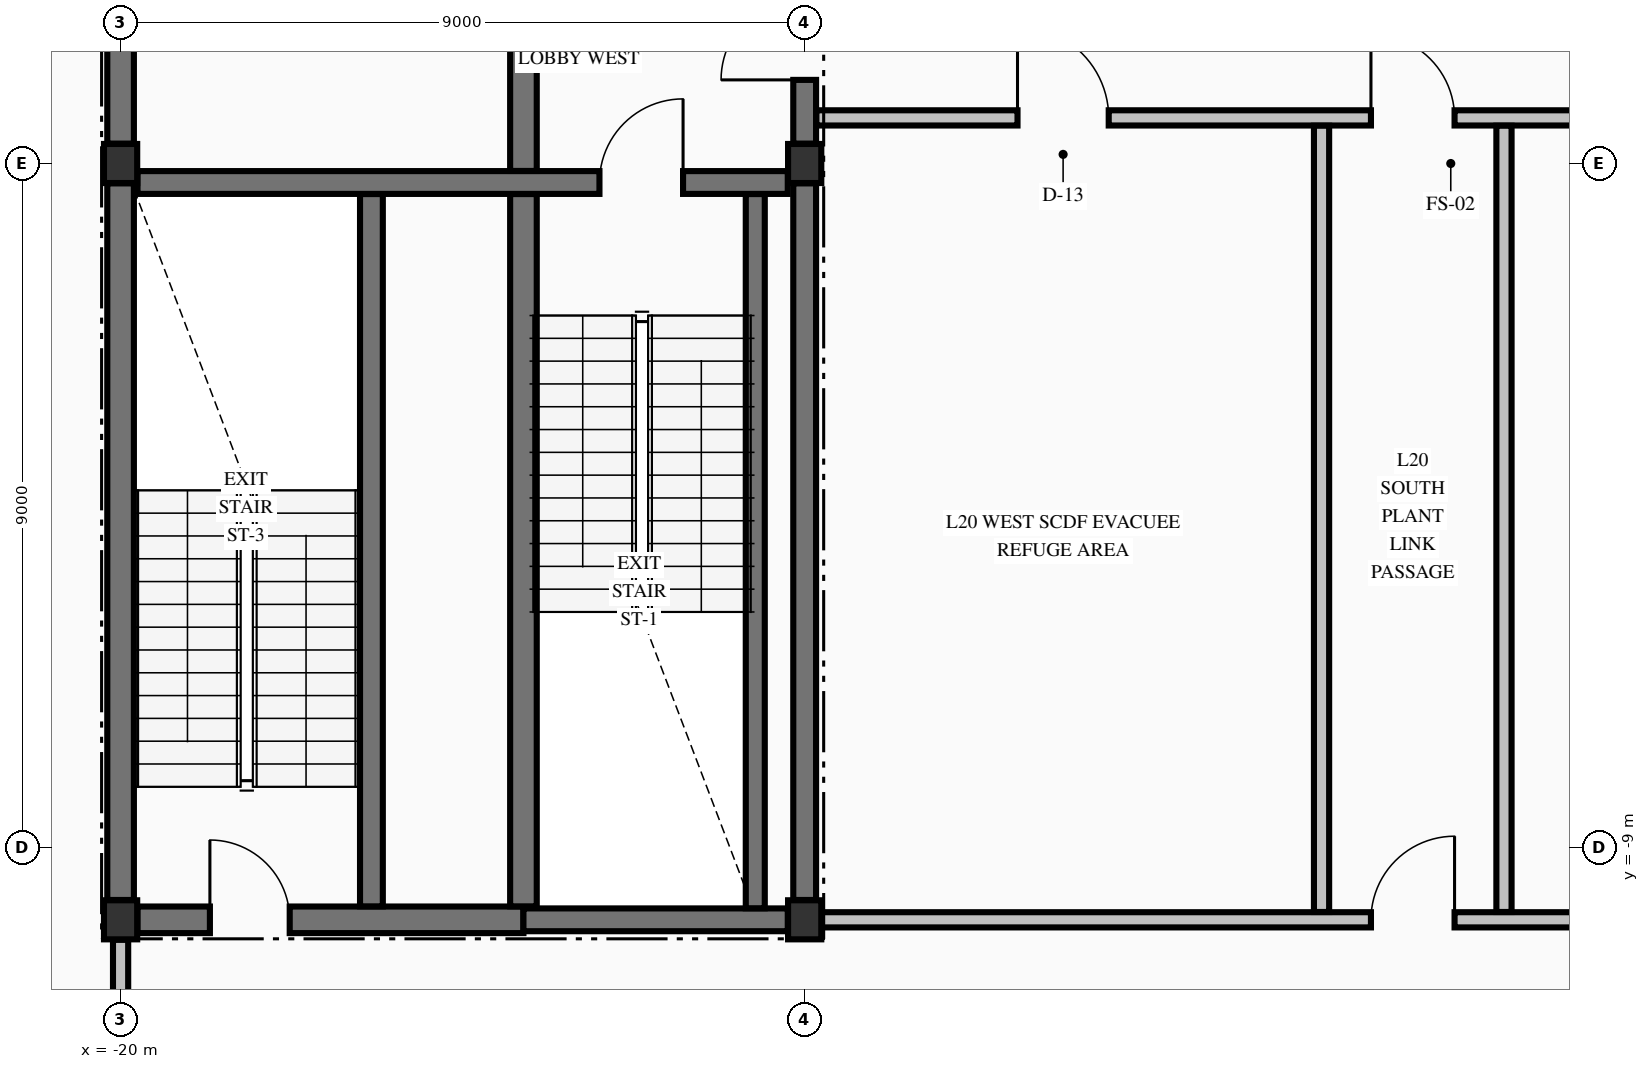
"""IFC4 building model, lengths in metres.
Left out: names, types, materials, properties, quantities, classifications, styles, units other than length and angle.
Written with IfcOpenShell. Run it as: python <this file> out.ifc"""

import sys

from ifc_helpers import new_model, si_unit, direction, frame, frame_2d, origin, origin_2d, place, context, subcontext, project, spatial, rectangle, i_section, extrude, element, fill, save


model = new_model("IFC4")
c1 = context("Model", 3, precision=1e-05, world=origin(), true_north=direction((0.0, 1.0)))
c2 = subcontext(c1, "Body", "Model", "MODEL_VIEW")
j1 = project(units=[si_unit("LENGTHUNIT", "METRE"), si_unit("PLANEANGLEUNIT", "RADIAN")], contexts=[c1])
p1 = place(None, origin())
s1 = spatial("IfcSite", under=j1, at=p1, CompositionType="ELEMENT")
p2 = place(p1, origin())
s2 = spatial("IfcBuilding", under=s1, at=p2, CompositionType="ELEMENT")
p3 = place(p2, frame((0.0, 0.0, 82.18)))
s3 = spatial("IfcBuildingStorey", under=s2, at=p3, CompositionType="ELEMENT", Elevation=82.18)
for number, where, z_axis, x_axis in (
    (1, (-20.0, -9.95, -0.425), (0.0, 0.0, 1.0), (1.0, 0.0, 0.0)),
    (2, (-11.0, -9.95, -0.425), (0.0, 0.0, 1.0), (1.0, 0.0, 0.0)),
    (3, (-11.0, 0.0, -0.425), (0.0, 0.0, 1.0), (1.0, 0.0, 0.0)),
    (4, (-20.0, 0.0, -0.425), (0.0, 0.0, 1.0), (1.0, 0.0, 0.0)),
):
    element("IfcColumn", number, at=place(p3, frame(where, z_axis=z_axis, x_axis=x_axis)), inside=s3, PredefinedType="COLUMN", context=c2, shape_type="SweptSolid", body=[
        extrude(i_section(OverallWidth=0.437, OverallDepth=0.514, WebThickness=0.061, FlangeThickness=0.097, FilletRadius=0.015, at=origin_2d()), origin(), (0.0, 0.0, 1.0), 4.76),
    ])
p4 = place(p3, frame((-19.778, -9.95, 0.0), z_axis=(0.0, 0.0, 1.0), x_axis=(1.0, 0.0, 0.0)))
e5 = element("IfcWall", 5, at=p4, inside=s3, PredefinedType="SHEAR", context=c2, shape_type="SweptSolid", body=[
    extrude(rectangle(XDim=5.078, YDim=0.35, at=frame_2d((2.539, 0.0))), origin(), (0.0, 0.0, 1.0), 4.335),
])
p5 = place(p4, frame((0.952, 0.0, 0.0)))
e6 = element("IfcOpeningElement", 6, at=p5, cuts=e5, PredefinedType="OPENING", context=c2, shape_type="SweptSolid", body=[
    extrude(rectangle(XDim=1.05, YDim=2.15, at=frame_2d((0.525, 1.075))), frame((0.0, 0.185, 0.0), z_axis=(0.0, -1.0, 0.0), x_axis=(1.0, 0.0, 0.0)), (0.0, 0.0, 1.0), 0.37),
])
p6 = place(p3, frame((-14.7, -9.95, 0.0), z_axis=(0.0, 0.0, 1.0), x_axis=(1.0, 0.0, 0.0)))
e7 = element("IfcWall", 7, at=p6, inside=s3, PredefinedType="SHEAR", context=c2, shape_type="SweptSolid", body=[
    extrude(rectangle(XDim=3.478, YDim=0.3, at=frame_2d((1.739, 0.0))), origin(), (0.0, 0.0, 1.0), 4.335),
])
p7 = place(p3, frame((-19.778, -0.25, 0.0), z_axis=(0.0, 0.0, 1.0), x_axis=(1.0, 0.0, 0.0)))
e8 = element("IfcWall", 8, at=p7, inside=s3, PredefinedType="SHEAR", context=c2, shape_type="SweptSolid", body=[
    extrude(rectangle(XDim=8.555, YDim=0.3, at=frame_2d((4.278, 0.0))), origin(), (0.0, 0.0, 1.0), 4.335),
])
p8 = place(p7, frame((6.077, 0.0, 0.0)))
e9 = element("IfcOpeningElement", 9, at=p8, cuts=e8, PredefinedType="OPENING", context=c2, shape_type="SweptSolid", body=[
    extrude(rectangle(XDim=1.1, YDim=2.15, at=frame_2d((0.55, 1.075))), frame((0.0, 0.16, 0.0), z_axis=(0.0, -1.0, 0.0), x_axis=(1.0, 0.0, 0.0)), (0.0, 0.0, 1.0), 0.32),
])
p9 = place(p3, frame((-10.775, -9.95, 0.0), z_axis=(0.0, 0.0, 1.0), x_axis=(1.0, 0.0, 0.0)))
e10 = element("IfcWall", 10, at=p9, inside=s3, PredefinedType="PARTITIONING", context=c2, shape_type="SweptSolid", body=[
    extrude(rectangle(XDim=21.551, YDim=0.2, at=frame_2d((10.775, 0.0))), origin(), (0.0, 0.0, 1.0), 4.335),
])
p10 = place(p9, frame((7.226, 0.0, 0.0)))
e11 = element("IfcOpeningElement", 11, at=p10, cuts=e10, PredefinedType="OPENING", context=c2, shape_type="SweptSolid", body=[
    extrude(rectangle(XDim=1.1, YDim=2.15, at=frame_2d((0.55, 1.075))), frame((0.0, 0.11, 0.0), z_axis=(0.0, -1.0, 0.0), x_axis=(1.0, 0.0, 0.0)), (0.0, 0.0, 1.0), 0.22),
])
p11 = place(p3, frame((-10.847, 0.6, 0.0), z_axis=(0.0, 0.0, 1.0), x_axis=(1.0, 0.0, 0.0)))
e12 = element("IfcWall", 12, at=p11, inside=s3, PredefinedType="PARTITIONING", context=c2, shape_type="SweptSolid", body=[
    extrude(rectangle(XDim=21.694, YDim=0.2, at=frame_2d((10.847, 0.0))), origin(), (0.0, 0.0, 1.0), 4.335),
])
p12 = place(p11, frame((7.297, 0.0, 0.0)))
e13 = element("IfcOpeningElement", 13, at=p12, cuts=e12, PredefinedType="OPENING", context=c2, shape_type="SweptSolid", body=[
    extrude(rectangle(XDim=1.1, YDim=2.15, at=frame_2d((0.55, 1.075))), frame((0.0, 0.11, 0.0), z_axis=(0.0, -1.0, 0.0), x_axis=(1.0, 0.0, 0.0)), (0.0, 0.0, 1.0), 0.22),
])
p13 = place(p11, frame((2.647, 0.0, 0.0)))
e14 = element("IfcOpeningElement", 14, at=p13, cuts=e12, PredefinedType="OPENING", context=c2, shape_type="SweptSolid", body=[
    extrude(rectangle(XDim=1.2, YDim=2.15, at=frame_2d((0.6, 1.075))), frame((0.0, 0.11, 0.0), z_axis=(0.0, -1.0, 0.0), x_axis=(1.0, 0.0, 0.0)), (0.0, 0.0, 1.0), 0.22),
])
p14 = place(p11, frame((14.847, 0.0, 0.0)))
e15 = element("IfcOpeningElement", 15, at=p14, cuts=e12, PredefinedType="OPENING", context=c2, shape_type="SweptSolid", body=[
    extrude(rectangle(XDim=1.2, YDim=2.15, at=frame_2d((0.6, 1.075))), frame((0.0, 0.11, 0.0), z_axis=(0.0, -1.0, 0.0), x_axis=(1.0, 0.0, 0.0)), (0.0, 0.0, 1.0), 0.22),
])
p15 = place(p3, frame((-20.0, -9.689, 0.0), z_axis=(0.0, 0.0, 1.0), x_axis=(0.0, 1.0, 0.0)))
e16 = element("IfcWall", 16, at=p15, inside=s3, PredefinedType="SHEAR", context=c2, shape_type="SweptSolid", body=[
    extrude(rectangle(XDim=9.428, YDim=0.35, at=frame_2d((4.714, 0.0))), origin(), (0.0, 0.0, 1.0), 4.335),
])
p16 = place(p3, frame((-20.0, 0.261, 0.0), z_axis=(0.0, 0.0, 1.0), x_axis=(0.0, 1.0, 0.0)))
e17 = element("IfcWall", 17, at=p16, inside=s3, PredefinedType="SHEAR", context=c2, shape_type="SweptSolid", body=[
    extrude(rectangle(XDim=9.978, YDim=0.35, at=frame_2d((4.989, 0.0))), origin(), (0.0, 0.0, 1.0), 4.335),
])
p17 = place(p3, frame((-16.7, -9.773, 0.0), z_axis=(0.0, 0.0, 1.0), x_axis=(0.0, 1.0, 0.0)))
e18 = element("IfcWall", 18, at=p17, inside=s3, PredefinedType="SHEAR", context=c2, shape_type="SweptSolid", body=[
    extrude(rectangle(XDim=9.371, YDim=0.3, at=frame_2d((4.686, 0.0))), origin(), (0.0, 0.0, 1.0), 4.335),
])
p18 = place(p3, frame((-14.7, -9.773, 0.0), z_axis=(0.0, 0.0, 1.0), x_axis=(0.0, 1.0, 0.0)))
e19 = element("IfcWall", 19, at=p18, inside=s3, PredefinedType="SHEAR", context=c2, shape_type="SweptSolid", body=[
    extrude(rectangle(XDim=9.371, YDim=0.35, at=frame_2d((4.686, 0.0))), origin(), (0.0, 0.0, 1.0), 4.335),
])
p19 = place(p3, frame((-14.7, -0.098, 0.0), z_axis=(0.0, 0.0, 1.0), x_axis=(0.0, 1.0, 0.0)))
e20 = element("IfcWall", 20, at=p19, inside=s3, PredefinedType="SHEAR", context=c2, shape_type="SweptSolid", body=[
    extrude(rectangle(XDim=2.846, YDim=0.35, at=frame_2d((1.423, 0.0))), origin(), (0.0, 0.0, 1.0), 4.335),
])
p20 = place(p3, frame((-11.65, -9.798, 0.0), z_axis=(0.0, 0.0, 1.0), x_axis=(0.0, 1.0, 0.0)))
e21 = element("IfcWall", 21, at=p20, inside=s3, PredefinedType="SOLIDWALL", context=c2, shape_type="SweptSolid", body=[
    extrude(rectangle(XDim=9.396, YDim=0.25, at=frame_2d((4.698, 0.0))), origin(), (0.0, 0.0, 1.0), 4.335),
])
p21 = place(p3, frame((-11.0, -9.689, 0.0), z_axis=(0.0, 0.0, 1.0), x_axis=(0.0, 1.0, 0.0)))
e22 = element("IfcWall", 22, at=p21, inside=s3, PredefinedType="SHEAR", context=c2, shape_type="SweptSolid", body=[
    extrude(rectangle(XDim=9.428, YDim=0.3, at=frame_2d((4.714, 0.0))), origin(), (0.0, 0.0, 1.0), 4.335),
])
p22 = place(p3, frame((-11.0, 0.261, 0.0), z_axis=(0.0, 0.0, 1.0), x_axis=(0.0, 1.0, 0.0)))
e23 = element("IfcWall", 23, at=p22, inside=s3, PredefinedType="SHEAR", context=c2, shape_type="SweptSolid", body=[
    extrude(rectangle(XDim=2.487, YDim=0.3, at=frame_2d((1.244, 0.0))), origin(), (0.0, 0.0, 1.0), 4.335),
])
p23 = place(p22, frame((0.839, 0.0, 0.0)))
e24 = element("IfcOpeningElement", 24, at=p23, cuts=e23, PredefinedType="OPENING", context=c2, shape_type="SweptSolid", body=[
    extrude(rectangle(XDim=1.1, YDim=2.15, at=frame_2d((0.55, 1.075))), frame((0.0, 0.16, 0.0), z_axis=(0.0, -1.0, 0.0), x_axis=(1.0, 0.0, 0.0)), (0.0, 0.0, 1.0), 0.32),
])
p24 = place(p3, frame((-20.0, -12.697, 0.0), z_axis=(0.0, 0.0, 1.0), x_axis=(0.0, 1.0, 0.0)))
e25 = element("IfcWall", 25, at=p24, inside=s3, PredefinedType="PARTITIONING", context=c2, shape_type="SweptSolid", body=[
    extrude(rectangle(XDim=2.484, YDim=0.2, at=frame_2d((1.242, 0.0))), origin(), (0.0, 0.0, 1.0), 1.927),
])
for number, where, z_axis, x_axis in (
    (26, (-4.2, -9.847, 0.0), (0.0, 0.0, 1.0), (0.0, 1.0, 0.0)),
    (27, (-1.8, -9.847, 0.0), (0.0, 0.0, 1.0), (0.0, 1.0, 0.0)),
):
    element("IfcWall", number, at=place(p3, frame(where, z_axis=z_axis, x_axis=x_axis)), inside=s3, PredefinedType="PARTITIONING", context=c2, shape_type="SweptSolid", body=[
        extrude(rectangle(XDim=10.344, YDim=0.2, at=frame_2d((5.172, 0.0))), origin(), (0.0, 0.0, 1.0), 4.335),
    ])
p25 = place(p8, origin())
e28 = element("IfcDoor", 28, at=p25, inside=s3, OperationType="SINGLE_SWING_RIGHT", PredefinedType="DOOR", context=c2, shape_type="SweptSolid", body=[
    extrude(rectangle(XDim=1.1, YDim=2.15, at=frame_2d((0.55, 1.075))), frame((0.0, 0.025, 0.0), z_axis=(0.0, -1.0, 0.0), x_axis=(1.0, 0.0, 0.0)), (0.0, 0.0, 1.0), 0.05),
])
fill(e9, e28)
p26 = place(p23, origin())
e29 = element("IfcDoor", 29, at=p26, inside=s3, OperationType="SINGLE_SWING_LEFT", PredefinedType="DOOR", context=c2, shape_type="SweptSolid", body=[
    extrude(rectangle(XDim=1.1, YDim=2.15, at=frame_2d((0.55, 1.075))), frame((0.0, 0.025, 0.0), z_axis=(0.0, -1.0, 0.0), x_axis=(1.0, 0.0, 0.0)), (0.0, 0.0, 1.0), 0.05),
])
fill(e24, e29)
p27 = place(p5, origin())
e30 = element("IfcDoor", 30, at=p27, inside=s3, OperationType="SINGLE_SWING_LEFT", PredefinedType="DOOR", context=c2, shape_type="SweptSolid", body=[
    extrude(rectangle(XDim=1.05, YDim=2.15, at=frame_2d((0.525, 1.075))), frame((0.0, 0.025, 0.0), z_axis=(0.0, -1.0, 0.0), x_axis=(1.0, 0.0, 0.0)), (0.0, 0.0, 1.0), 0.05),
])
fill(e6, e30)
p28 = place(p12, origin())
e31 = element("IfcDoor", 31, at=p28, inside=s3, OperationType="SINGLE_SWING_LEFT", PredefinedType="DOOR", context=c2, shape_type="SweptSolid", body=[
    extrude(rectangle(XDim=1.1, YDim=2.15, at=frame_2d((0.55, 1.075))), frame((0.0, 0.025, 0.0), z_axis=(0.0, -1.0, 0.0), x_axis=(1.0, 0.0, 0.0)), (0.0, 0.0, 1.0), 0.05),
])
fill(e13, e31)
p29 = place(p10, origin())
e32 = element("IfcDoor", 32, at=p29, inside=s3, OperationType="SINGLE_SWING_RIGHT", PredefinedType="DOOR", context=c2, shape_type="SweptSolid", body=[
    extrude(rectangle(XDim=1.1, YDim=2.15, at=frame_2d((0.55, 1.075))), frame((0.0, 0.025, 0.0), z_axis=(0.0, -1.0, 0.0), x_axis=(1.0, 0.0, 0.0)), (0.0, 0.0, 1.0), 0.05),
])
fill(e11, e32)
p30 = place(p13, origin())
e33 = element("IfcDoor", 33, at=p30, inside=s3, OperationType="SINGLE_SWING_LEFT", PredefinedType="DOOR", context=c2, shape_type="SweptSolid", body=[
    extrude(rectangle(XDim=1.2, YDim=2.15, at=frame_2d((0.6, 1.075))), frame((0.0, 0.025, 0.0), z_axis=(0.0, -1.0, 0.0), x_axis=(1.0, 0.0, 0.0)), (0.0, 0.0, 1.0), 0.05),
])
fill(e14, e33)
save(model, sys.argv[1])
